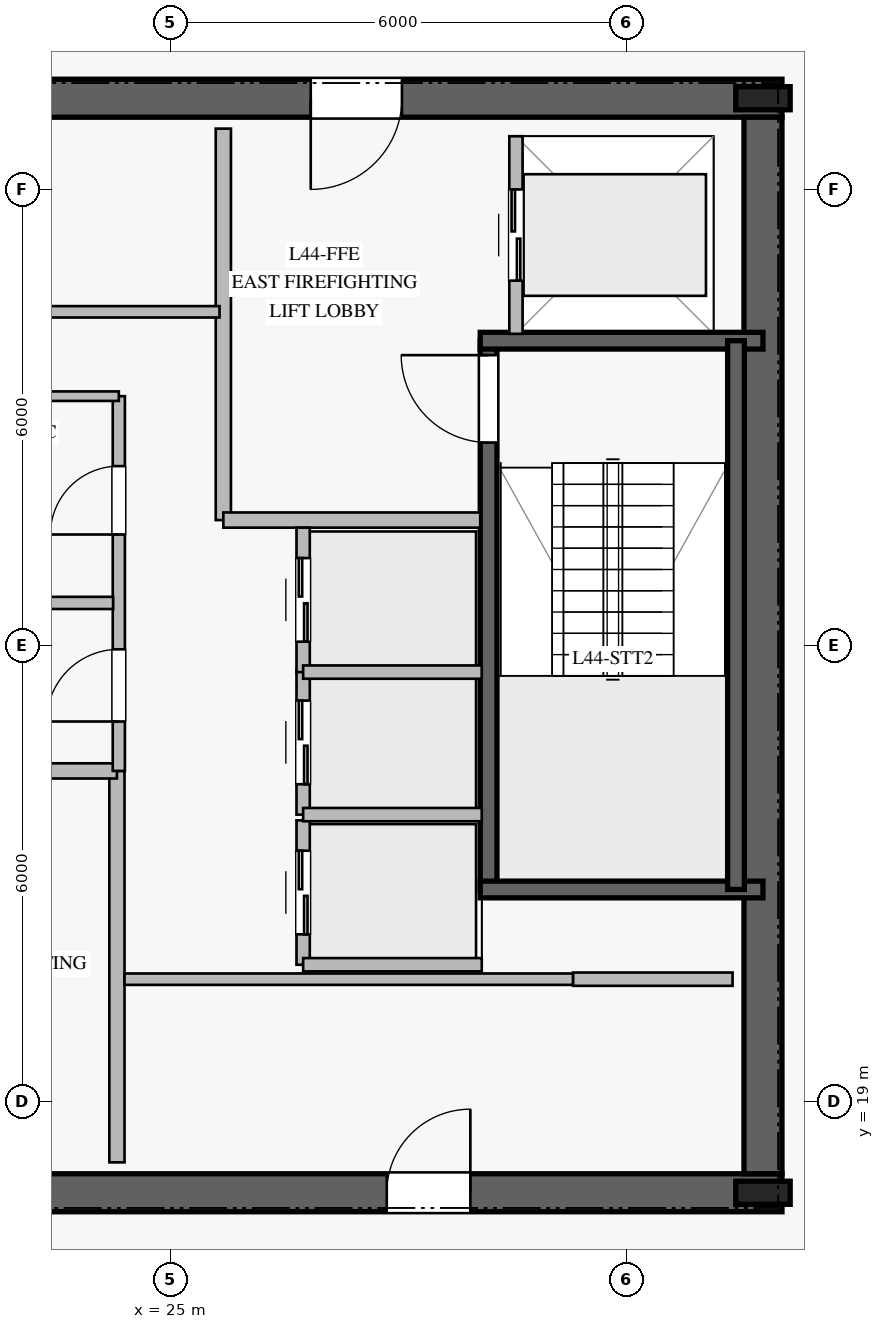
"""IFC4 building model, lengths in metres.
Left out: names, types, materials, properties, quantities, classifications, styles, units other than length and angle.
Written with IfcOpenShell. Run it as: python <this file> out.ifc"""

import sys

from ifc_helpers import new_model, si_unit, direction, frame, frame_2d, origin, origin_2d, place, context, subcontext, project, spatial, rectangle, i_section, extrude, element, fill, save


model = new_model("IFC4")
c1 = context("Model", 3, precision=1e-05, world=origin(), true_north=direction((0.0, 1.0)))
c2 = subcontext(c1, "Body", "Model", "MODEL_VIEW")
j1 = project(units=[si_unit("LENGTHUNIT", "METRE"), si_unit("PLANEANGLEUNIT", "RADIAN")], contexts=[c1])
p1 = place(None, origin())
s1 = spatial("IfcSite", under=j1, at=p1, CompositionType="ELEMENT")
p2 = place(p1, origin())
s2 = spatial("IfcBuilding", under=s1, at=p2, CompositionType="ELEMENT")
p3 = place(p2, frame((0.0, 0.0, 184.8)))
s3 = spatial("IfcBuildingStorey", under=s2, at=p3, CompositionType="ELEMENT", Elevation=184.8)
p4 = place(p3, frame((16.95, 17.8, 0.0), z_axis=(0.0, 0.0, 1.0), x_axis=(1.0, 0.0, 0.0)))
e1 = element("IfcWall", 1, at=p4, inside=s3, PredefinedType="SHEAR", context=c2, shape_type="SweptSolid", body=[
    extrude(rectangle(XDim=16.1, YDim=0.5, at=frame_2d((8.05, 0.0))), origin(), (0.0, 0.0, 1.0), 3.78),
])
p5 = place(p4, frame((5.0, 0.0, 0.0)))
e2 = element("IfcOpeningElement", 2, at=p5, cuts=e1, PredefinedType="OPENING", context=c2, shape_type="SweptSolid", body=[
    extrude(rectangle(XDim=1.2, YDim=2.25, at=frame_2d((0.6, 1.125))), frame((0.0, 0.26, 0.0), z_axis=(0.0, -1.0, 0.0), x_axis=(1.0, 0.0, 0.0)), (0.0, 0.0, 1.0), 0.52),
])
p6 = place(p4, frame((10.9, 0.0, 0.0)))
e3 = element("IfcOpeningElement", 3, at=p6, cuts=e1, PredefinedType="OPENING", context=c2, shape_type="SweptSolid", body=[
    extrude(rectangle(XDim=1.1, YDim=2.2, at=frame_2d((0.55, 1.1))), frame((0.0, 0.26, 0.0), z_axis=(0.0, -1.0, 0.0), x_axis=(1.0, 0.0, 0.0)), (0.0, 0.0, 1.0), 0.52),
])
p7 = place(p3, frame((33.05, 32.2, 0.0), z_axis=(0.0, 0.0, 1.0), x_axis=(-1.0, 0.0, 0.0)))
e4 = element("IfcWall", 4, at=p7, inside=s3, PredefinedType="SHEAR", context=c2, shape_type="SweptSolid", body=[
    extrude(rectangle(XDim=16.1, YDim=0.5, at=frame_2d((8.05, 0.0))), origin(), (0.0, 0.0, 1.0), 3.78),
])
p8 = place(p7, frame((5.0, 0.0, 0.0)))
e5 = element("IfcOpeningElement", 5, at=p8, cuts=e4, PredefinedType="OPENING", context=c2, shape_type="SweptSolid", body=[
    extrude(rectangle(XDim=1.2, YDim=2.25, at=frame_2d((0.6, 1.125))), frame((0.0, 0.26, 0.0), z_axis=(0.0, -1.0, 0.0), x_axis=(1.0, 0.0, 0.0)), (0.0, 0.0, 1.0), 0.52),
])
p9 = place(p7, frame((9.825, 0.0, 0.0)))
e6 = element("IfcOpeningElement", 6, at=p9, cuts=e4, PredefinedType="OPENING", context=c2, shape_type="SweptSolid", body=[
    extrude(rectangle(XDim=1.1, YDim=2.2, at=frame_2d((0.55, 1.1))), frame((0.0, 0.26, 0.0), z_axis=(0.0, -1.0, 0.0), x_axis=(1.0, 0.0, 0.0)), (0.0, 0.0, 1.0), 0.52),
])
p10 = place(p3, frame((32.8, 18.05, 0.0), z_axis=(0.0, 0.0, 1.0), x_axis=(0.0, 1.0, 0.0)))
e7 = element("IfcWall", 7, at=p10, inside=s3, PredefinedType="SHEAR", context=c2, shape_type="SweptSolid", body=[
    extrude(rectangle(XDim=13.9, YDim=0.5, at=frame_2d((6.95, 0.0))), origin(), (0.0, 0.0, 1.0), 3.78),
])
for number, where, z_axis, x_axis in (
    (8, (32.8, 17.8, 0.0), (0.0, 0.0, 1.0), (1.0, 0.0, 0.0)),
    (9, (32.8, 32.2, 0.0), (0.0, 0.0, 1.0), (1.0, 0.0, 0.0)),
):
    element("IfcColumn", number, at=place(p3, frame(where, z_axis=z_axis, x_axis=x_axis)), inside=s3, PredefinedType="COLUMN", context=c2, shape_type="SweptSolid", body=[
        extrude(i_section(OverallWidth=0.304, OverallDepth=0.716, WebThickness=0.021, FlangeThickness=0.04, at=origin_2d()), origin(), (0.0, 0.0, 1.0), 4.0),
    ])
p11 = place(p3, frame((29.19, 21.79, 0.0), z_axis=(0.0, 0.0, 1.0), x_axis=(0.0, 1.0, 0.0)))
e10 = element("IfcWall", 10, at=p11, inside=s3, PredefinedType="SOLIDWALL", context=c2, shape_type="SweptSolid", body=[
    extrude(rectangle(XDim=7.22, YDim=0.22, at=frame_2d((3.61, 0.0))), origin(), (0.0, 0.0, 1.0), 3.78),
])
p12 = place(p11, frame((5.88, 0.0, 0.0)))
e11 = element("IfcOpeningElement", 11, at=p12, cuts=e10, PredefinedType="OPENING", context=c2, shape_type="SweptSolid", body=[
    extrude(rectangle(XDim=1.15, YDim=2.2, at=frame_2d((0.575, 1.1))), frame((0.0, 0.12, 0.0), z_axis=(0.0, -1.0, 0.0), x_axis=(1.0, 0.0, 0.0)), (0.0, 0.0, 1.0), 0.24),
])
for number, where, z_axis, x_axis in (
    (12, (29.08, 21.79, 0.0), (0.0, 0.0, 1.0), (1.0, 0.0, 0.0)),
    (13, (29.08, 29.01, 0.0), (0.0, 0.0, 1.0), (1.0, 0.0, 0.0)),
):
    element("IfcWall", number, at=place(p3, frame(where, z_axis=z_axis, x_axis=x_axis)), inside=s3, PredefinedType="SOLIDWALL", context=c2, shape_type="SweptSolid", body=[
        extrude(rectangle(XDim=3.72, YDim=0.22, at=frame_2d((1.86, 0.0))), origin(), (0.0, 0.0, 1.0), 3.78),
    ])
p13 = place(p3, frame((32.445, 29.01, 0.0), z_axis=(0.0, 0.0, 1.0), x_axis=(0.0, -1.0, 0.0)))
e14 = element("IfcWall", 14, at=p13, inside=s3, PredefinedType="SOLIDWALL", context=c2, shape_type="SweptSolid", body=[
    extrude(rectangle(XDim=7.22, YDim=0.22, at=frame_2d((3.61, 0.0))), origin(), (0.0, 0.0, 1.0), 3.78),
])
p14 = place(p3, frame((24.3, 18.2, 0.0), z_axis=(0.0, 0.0, 1.0), x_axis=(0.0, 1.0, 0.0)))
e15 = element("IfcWall", 15, at=p14, inside=s3, PredefinedType="PARTITIONING", context=c2, shape_type="SweptSolid", body=[
    extrude(rectangle(XDim=5.15, YDim=0.2, at=frame_2d((2.575, 0.0))), origin(), (0.0, 0.0, 1.0), 3.78),
])
p15 = place(p3, frame((20.92, 23.35, 0.0), z_axis=(0.0, 0.0, 1.0), x_axis=(1.0, 0.0, 0.0)))
e16 = element("IfcWall", 16, at=p15, inside=s3, PredefinedType="PARTITIONING", context=c2, shape_type="SweptSolid", body=[
    extrude(rectangle(XDim=3.38, YDim=0.2, at=frame_2d((1.69, 0.0))), origin(), (0.0, 0.0, 1.0), 3.78),
])
p16 = place(p3, frame((25.7, 26.65, 0.0), z_axis=(0.0, 0.0, 1.0), x_axis=(0.0, 1.0, 0.0)))
e17 = element("IfcWall", 17, at=p16, inside=s3, PredefinedType="PARTITIONING", context=c2, shape_type="SweptSolid", body=[
    extrude(rectangle(XDim=5.15, YDim=0.2, at=frame_2d((2.575, 0.0))), origin(), (0.0, 0.0, 1.0), 3.78),
])
p17 = place(p3, frame((25.7, 26.65, 0.0), z_axis=(0.0, 0.0, 1.0), x_axis=(1.0, 0.0, 0.0)))
e18 = element("IfcWall", 18, at=p17, inside=s3, PredefinedType="PARTITIONING", context=c2, shape_type="SweptSolid", body=[
    extrude(rectangle(XDim=3.38, YDim=0.2, at=frame_2d((1.69, 0.0))), origin(), (0.0, 0.0, 1.0), 3.78),
])
p18 = place(p3, frame((24.325, 23.35, 0.0), z_axis=(0.0, 0.0, 1.0), x_axis=(0.0, 1.0, 0.0)))
e19 = element("IfcWall", 19, at=p18, inside=s3, PredefinedType="PLUMBINGWALL", context=c2, shape_type="SweptSolid", body=[
    extrude(rectangle(XDim=4.93, YDim=0.16, at=frame_2d((2.465, 0.0))), origin(), (0.0, 0.0, 1.0), 3.78),
])
p19 = place(p18, frame((0.65, 0.0, 0.0)))
e20 = element("IfcOpeningElement", 20, at=p19, cuts=e19, PredefinedType="OPENING", context=c2, shape_type="SweptSolid", body=[
    extrude(rectangle(XDim=0.95, YDim=2.1, at=frame_2d((0.475, 1.05))), frame((0.0, 0.09, 0.0), z_axis=(0.0, -1.0, 0.0), x_axis=(1.0, 0.0, 0.0)), (0.0, 0.0, 1.0), 0.18),
])
p20 = place(p18, frame((3.11, 0.0, 0.0)))
e21 = element("IfcOpeningElement", 21, at=p20, cuts=e19, PredefinedType="OPENING", context=c2, shape_type="SweptSolid", body=[
    extrude(rectangle(XDim=0.9, YDim=2.1, at=frame_2d((0.45, 1.05))), frame((0.0, 0.09, 0.0), z_axis=(0.0, -1.0, 0.0), x_axis=(1.0, 0.0, 0.0)), (0.0, 0.0, 1.0), 0.18),
])
p21 = place(p3, frame((20.92, 28.28, 0.0), z_axis=(0.0, 0.0, 1.0), x_axis=(1.0, 0.0, 0.0)))
e22 = element("IfcWall", 22, at=p21, inside=s3, PredefinedType="PARTITIONING", context=c2, shape_type="SweptSolid", body=[
    extrude(rectangle(XDim=3.405, YDim=0.125, at=frame_2d((1.703, 0.0))), origin(), (0.0, 0.0, 1.0), 3.78),
])
p22 = place(p21, frame((0.255, 0.0, 0.0)))
e23 = element("IfcOpeningElement", 23, at=p22, cuts=e22, PredefinedType="OPENING", context=c2, shape_type="SweptSolid", body=[
    extrude(rectangle(XDim=1.0, YDim=2.15, at=frame_2d((0.5, 1.075))), frame((0.0, 0.073, 0.0), z_axis=(0.0, -1.0, 0.0), x_axis=(1.0, 0.0, 0.0)), (0.0, 0.0, 1.0), 0.145),
])
p23 = place(p3, frame((20.95, 25.56, 0.0), z_axis=(0.0, 0.0, 1.0), x_axis=(1.0, 0.0, 0.0)))
e24 = element("IfcWall", 24, at=p23, inside=s3, PredefinedType="PLUMBINGWALL", context=c2, shape_type="SweptSolid", body=[
    extrude(rectangle(XDim=3.3, YDim=0.16, at=frame_2d((1.65, 0.0))), origin(), (0.0, 0.0, 1.0), 3.78),
])
p24 = place(p3, frame((30.3, 20.61, 0.0), z_axis=(0.0, 0.0, 1.0), x_axis=(1.0, 0.0, 0.0)))
e25 = element("IfcWall", 25, at=p24, inside=s3, PredefinedType="PARTITIONING", context=c2, shape_type="SweptSolid", body=[
    extrude(rectangle(XDim=2.1, YDim=0.175, at=frame_2d((1.05, 0.0))), origin(), (0.0, 0.0, 1.0), 3.78),
])
p25 = place(p3, frame((24.4, 20.61, 0.0), z_axis=(0.0, 0.0, 1.0), x_axis=(1.0, 0.0, 0.0)))
e26 = element("IfcWall", 26, at=p25, inside=s3, PredefinedType="PARTITIONING", context=c2, shape_type="SweptSolid", body=[
    extrude(rectangle(XDim=5.9, YDim=0.15, at=frame_2d((2.95, 0.0))), origin(), (0.0, 0.0, 1.0), 3.78),
])
p26 = place(p3, frame((19.75, 29.39, 0.0), z_axis=(0.0, 0.0, 1.0), x_axis=(1.0, 0.0, 0.0)))
e27 = element("IfcWall", 27, at=p26, inside=s3, PredefinedType="PARTITIONING", context=c2, shape_type="SweptSolid", body=[
    extrude(rectangle(XDim=5.9, YDim=0.15, at=frame_2d((2.95, 0.0))), origin(), (0.0, 0.0, 1.0), 3.78),
])
p27 = place(p3, frame((26.75, 20.8, 0.0), z_axis=(0.0, 0.0, 1.0), x_axis=(0.0, 1.0, 0.0)))
e28 = element("IfcWall", 28, at=p27, inside=s3, PredefinedType="PARTITIONING", context=c2, shape_type="SweptSolid", body=[
    extrude(rectangle(XDim=1.9, YDim=0.175, at=frame_2d((0.95, 0.0))), origin(), (0.0, 0.0, 1.0), 3.78),
])
p28 = place(p27, frame((0.4, 0.0, 0.0)))
e29 = element("IfcOpeningElement", 29, at=p28, cuts=e28, PredefinedType="OPENING", context=c2, shape_type="SweptSolid", body=[
    extrude(rectangle(XDim=1.1, YDim=2.2, at=frame_2d((0.55, 1.1))), frame((0.0, 0.098, 0.0), z_axis=(0.0, -1.0, 0.0), x_axis=(1.0, 0.0, 0.0)), (0.0, 0.0, 1.0), 0.195),
])
p29 = place(p3, frame((26.75, 20.8, 0.0), z_axis=(0.0, 0.0, 1.0), x_axis=(1.0, 0.0, 0.0)))
e30 = element("IfcWall", 30, at=p29, inside=s3, PredefinedType="PARTITIONING", context=c2, shape_type="SweptSolid", body=[
    extrude(rectangle(XDim=2.35, YDim=0.175, at=frame_2d((1.175, 0.0))), origin(), (0.0, 0.0, 1.0), 3.78),
])
p30 = place(p3, frame((26.75, 22.775, 0.0), z_axis=(0.0, 0.0, 1.0), x_axis=(0.0, 1.0, 0.0)))
e31 = element("IfcWall", 31, at=p30, inside=s3, PredefinedType="PARTITIONING", context=c2, shape_type="SweptSolid", body=[
    extrude(rectangle(XDim=1.9, YDim=0.175, at=frame_2d((0.95, 0.0))), origin(), (0.0, 0.0, 1.0), 3.78),
])
p31 = place(p30, frame((0.4, 0.0, 0.0)))
e32 = element("IfcOpeningElement", 32, at=p31, cuts=e31, PredefinedType="OPENING", context=c2, shape_type="SweptSolid", body=[
    extrude(rectangle(XDim=1.1, YDim=2.2, at=frame_2d((0.55, 1.1))), frame((0.0, 0.098, 0.0), z_axis=(0.0, -1.0, 0.0), x_axis=(1.0, 0.0, 0.0)), (0.0, 0.0, 1.0), 0.195),
])
p32 = place(p3, frame((26.75, 22.775, 0.0), z_axis=(0.0, 0.0, 1.0), x_axis=(1.0, 0.0, 0.0)))
e33 = element("IfcWall", 33, at=p32, inside=s3, PredefinedType="PARTITIONING", context=c2, shape_type="SweptSolid", body=[
    extrude(rectangle(XDim=2.35, YDim=0.175, at=frame_2d((1.175, 0.0))), origin(), (0.0, 0.0, 1.0), 3.78),
])
p33 = place(p3, frame((26.75, 24.65, 0.0), z_axis=(0.0, 0.0, 1.0), x_axis=(0.0, 1.0, 0.0)))
e34 = element("IfcWall", 34, at=p33, inside=s3, PredefinedType="PARTITIONING", context=c2, shape_type="SweptSolid", body=[
    extrude(rectangle(XDim=1.9, YDim=0.175, at=frame_2d((0.95, 0.0))), origin(), (0.0, 0.0, 1.0), 3.78),
])
p34 = place(p33, frame((0.4, 0.0, 0.0)))
e35 = element("IfcOpeningElement", 35, at=p34, cuts=e34, PredefinedType="OPENING", context=c2, shape_type="SweptSolid", body=[
    extrude(rectangle(XDim=1.1, YDim=2.2, at=frame_2d((0.55, 1.1))), frame((0.0, 0.098, 0.0), z_axis=(0.0, -1.0, 0.0), x_axis=(1.0, 0.0, 0.0)), (0.0, 0.0, 1.0), 0.195),
])
p35 = place(p3, frame((26.75, 24.65, 0.0), z_axis=(0.0, 0.0, 1.0), x_axis=(1.0, 0.0, 0.0)))
e36 = element("IfcWall", 36, at=p35, inside=s3, PredefinedType="PARTITIONING", context=c2, shape_type="SweptSolid", body=[
    extrude(rectangle(XDim=2.35, YDim=0.175, at=frame_2d((1.175, 0.0))), origin(), (0.0, 0.0, 1.0), 3.78),
])
p36 = place(p3, frame((29.55, 29.1, 0.0), z_axis=(0.0, 0.0, 1.0), x_axis=(0.0, 1.0, 0.0)))
e37 = element("IfcWall", 37, at=p36, inside=s3, PredefinedType="PARTITIONING", context=c2, shape_type="SweptSolid", body=[
    extrude(rectangle(XDim=2.6, YDim=0.175, at=frame_2d((1.3, 0.0))), origin(), (0.0, 0.0, 1.0), 3.78),
])
p37 = place(p36, frame((0.7, 0.0, 0.0)))
e38 = element("IfcOpeningElement", 38, at=p37, cuts=e37, PredefinedType="OPENING", context=c2, shape_type="SweptSolid", body=[
    extrude(rectangle(XDim=1.2, YDim=2.2, at=frame_2d((0.6, 1.1))), frame((0.0, 0.098, 0.0), z_axis=(0.0, -1.0, 0.0), x_axis=(1.0, 0.0, 0.0)), (0.0, 0.0, 1.0), 0.195),
])
p38 = place(p12, origin())
e39 = element("IfcDoor", 39, at=p38, inside=s3, OperationType="SINGLE_SWING_RIGHT", PredefinedType="DOOR", context=c2, shape_type="SweptSolid", body=[
    extrude(rectangle(XDim=1.15, YDim=2.2, at=frame_2d((0.575, 1.1))), frame((0.0, 0.025, 0.0), z_axis=(0.0, -1.0, 0.0), x_axis=(1.0, 0.0, 0.0)), (0.0, 0.0, 1.0), 0.05),
])
fill(e11, e39)
p39 = place(p8, origin())
e40 = element("IfcDoor", 40, at=p39, inside=s3, OperationType="SINGLE_SWING_RIGHT", PredefinedType="DOOR", context=c2, shape_type="SweptSolid", body=[
    extrude(rectangle(XDim=1.2, YDim=2.25, at=frame_2d((0.6, 1.125))), frame((0.0, 0.025, 0.0), z_axis=(0.0, -1.0, 0.0), x_axis=(1.0, 0.0, 0.0)), (0.0, 0.0, 1.0), 0.05),
])
fill(e5, e40)
p40 = place(p19, origin())
e41 = element("IfcDoor", 41, at=p40, inside=s3, OperationType="SINGLE_SWING_LEFT", PredefinedType="DOOR", context=c2, shape_type="SweptSolid", body=[
    extrude(rectangle(XDim=0.95, YDim=2.1, at=frame_2d((0.475, 1.05))), frame((0.0, 0.025, 0.0), z_axis=(0.0, -1.0, 0.0), x_axis=(1.0, 0.0, 0.0)), (0.0, 0.0, 1.0), 0.05),
])
fill(e20, e41)
p41 = place(p20, origin())
e42 = element("IfcDoor", 42, at=p41, inside=s3, OperationType="SINGLE_SWING_LEFT", PredefinedType="DOOR", context=c2, shape_type="SweptSolid", body=[
    extrude(rectangle(XDim=0.9, YDim=2.1, at=frame_2d((0.45, 1.05))), frame((0.0, 0.025, 0.0), z_axis=(0.0, -1.0, 0.0), x_axis=(1.0, 0.0, 0.0)), (0.0, 0.0, 1.0), 0.05),
])
fill(e21, e42)
p42 = place(p6, origin())
e43 = element("IfcDoor", 43, at=p42, inside=s3, OperationType="SINGLE_SWING_RIGHT", PredefinedType="DOOR", context=c2, shape_type="SweptSolid", body=[
    extrude(rectangle(XDim=1.1, YDim=2.2, at=frame_2d((0.55, 1.1))), frame((0.0, 0.025, 0.0), z_axis=(0.0, -1.0, 0.0), x_axis=(1.0, 0.0, 0.0)), (0.0, 0.0, 1.0), 0.05),
])
fill(e3, e43)
p43 = place(p28, origin())
e44 = element("IfcDoor", 44, at=p43, inside=s3, OperationType="DOUBLE_DOOR_SLIDING", PredefinedType="DOOR", context=c2, shape_type="SweptSolid", body=[
    extrude(rectangle(XDim=1.1, YDim=2.2, at=frame_2d((0.55, 1.1))), frame((0.0, 0.025, 0.0), z_axis=(0.0, -1.0, 0.0), x_axis=(1.0, 0.0, 0.0)), (0.0, 0.0, 1.0), 0.05),
])
fill(e29, e44)
p44 = place(p31, origin())
e45 = element("IfcDoor", 45, at=p44, inside=s3, OperationType="DOUBLE_DOOR_SLIDING", PredefinedType="DOOR", context=c2, shape_type="SweptSolid", body=[
    extrude(rectangle(XDim=1.1, YDim=2.2, at=frame_2d((0.55, 1.1))), frame((0.0, 0.025, 0.0), z_axis=(0.0, -1.0, 0.0), x_axis=(1.0, 0.0, 0.0)), (0.0, 0.0, 1.0), 0.05),
])
fill(e32, e45)
p45 = place(p34, origin())
e46 = element("IfcDoor", 46, at=p45, inside=s3, OperationType="DOUBLE_DOOR_SLIDING", PredefinedType="DOOR", context=c2, shape_type="SweptSolid", body=[
    extrude(rectangle(XDim=1.1, YDim=2.2, at=frame_2d((0.55, 1.1))), frame((0.0, 0.025, 0.0), z_axis=(0.0, -1.0, 0.0), x_axis=(1.0, 0.0, 0.0)), (0.0, 0.0, 1.0), 0.05),
])
fill(e35, e46)
p46 = place(p37, origin())
e47 = element("IfcDoor", 47, at=p46, inside=s3, OperationType="DOUBLE_DOOR_SLIDING", PredefinedType="DOOR", context=c2, shape_type="SweptSolid", body=[
    extrude(rectangle(XDim=1.2, YDim=2.2, at=frame_2d((0.6, 1.1))), frame((0.0, 0.025, 0.0), z_axis=(0.0, -1.0, 0.0), x_axis=(1.0, 0.0, 0.0)), (0.0, 0.0, 1.0), 0.05),
])
fill(e38, e47)
save(model, sys.argv[1])
